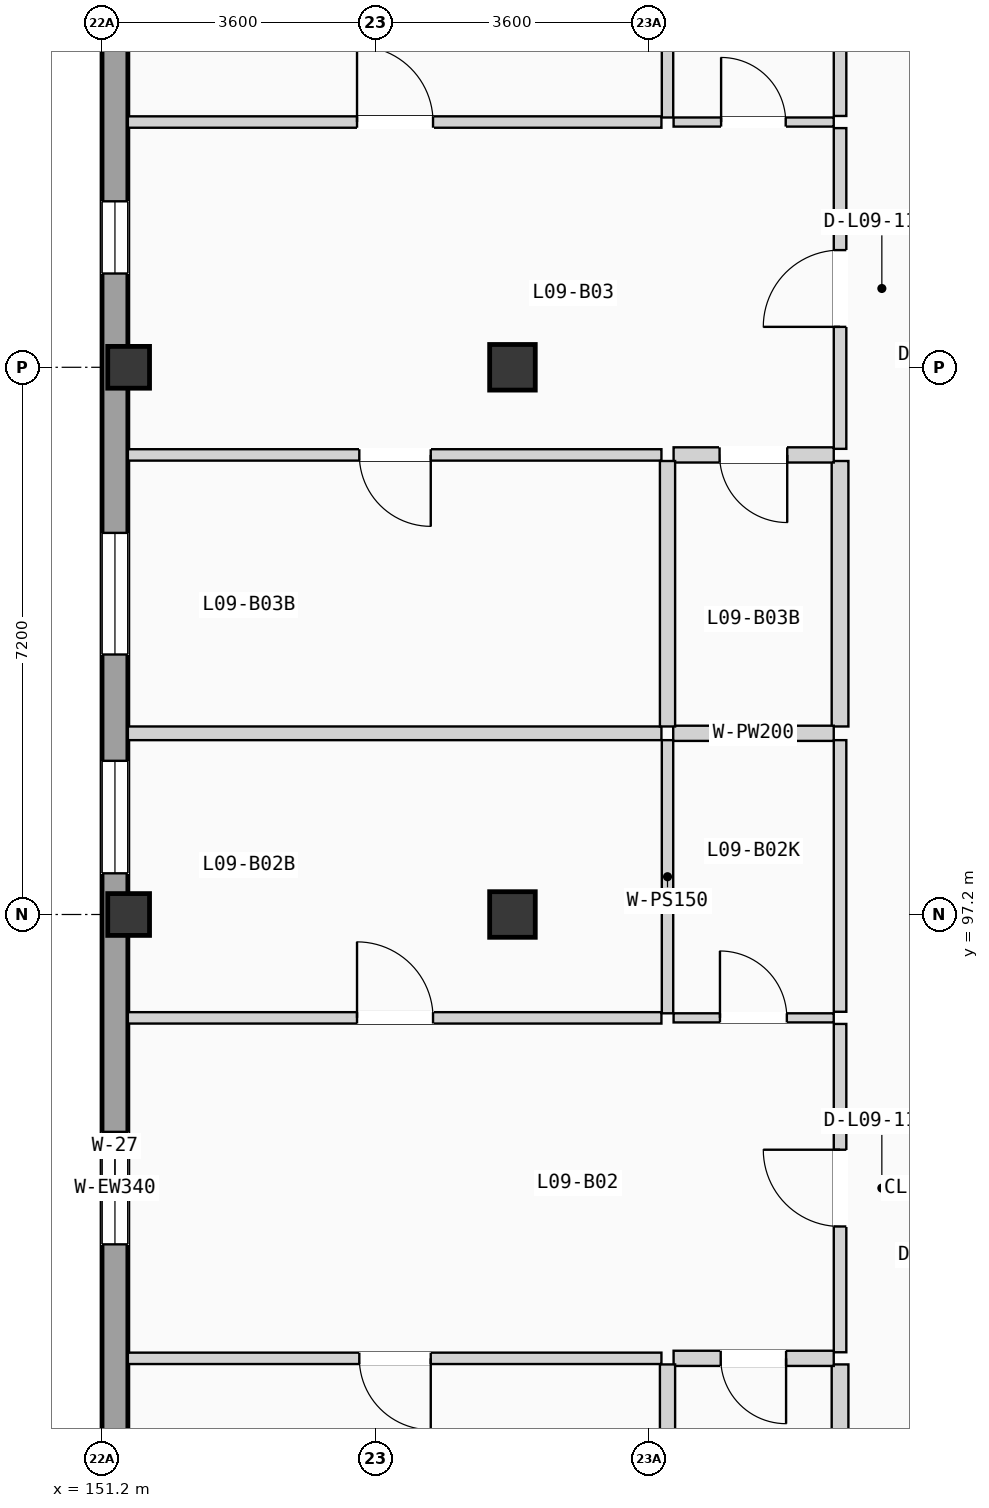
"""IFC4 building model, lengths in metres.
Left out: names, types, materials, properties, quantities, classifications, styles, units other than length and angle.
Written with IfcOpenShell. Run it as: python <this file> out.ifc"""

import sys

from ifc_helpers import new_model, si_unit, direction, frame, frame_2d, origin, origin_2d, place, context, subcontext, project, spatial, rectangle, extrude, element, fill, save


model = new_model("IFC4")
c1 = context("Model", 3, precision=1e-05, world=origin(), true_north=direction((0.0, 1.0)))
c2 = subcontext(c1, "Body", "Model", "MODEL_VIEW")
j1 = project(units=[si_unit("LENGTHUNIT", "METRE"), si_unit("PLANEANGLEUNIT", "RADIAN")], contexts=[c1])
p1 = place(None, origin())
s1 = spatial("IfcSite", under=j1, at=p1, CompositionType="ELEMENT")
p2 = place(p1, origin())
s2 = spatial("IfcBuilding", under=s1, at=p2, CompositionType="ELEMENT")
p3 = place(p2, frame((0.0, 0.0, 30.975)))
s3 = spatial("IfcBuildingStorey", under=s2, at=p3, CompositionType="ELEMENT", Elevation=30.975)
for number, where, z_axis, x_axis in (
    (1, (151.55, 97.2, 0.0), (0.0, 0.0, 1.0), (1.0, 0.0, 0.0)),
    (2, (151.55, 104.4, 0.0), (0.0, 0.0, 1.0), (1.0, 0.0, 0.0)),
):
    element("IfcColumn", number, at=place(p3, frame(where, z_axis=z_axis, x_axis=x_axis)), inside=s3, PredefinedType="COLUMN", context=c2, shape_type="SweptSolid", body=[
        extrude(rectangle(XDim=0.55, YDim=0.55, at=origin_2d()), origin(), (0.0, 0.0, 1.0), 3.15),
    ])
for number, where, z_axis, x_axis in (
    (3, (156.6, 97.2, 0.0), (0.0, 0.0, 1.0), (1.0, 0.0, 0.0)),
    (4, (156.6, 104.4, 0.0), (0.0, 0.0, 1.0), (1.0, 0.0, 0.0)),
):
    element("IfcColumn", number, at=place(p3, frame(where, z_axis=z_axis, x_axis=x_axis)), inside=s3, PredefinedType="COLUMN", context=c2, shape_type="SweptSolid", body=[
        extrude(rectangle(XDim=0.6, YDim=0.6, at=origin_2d()), origin(), (0.0, 0.0, 1.0), 3.15),
    ])
p4 = place(p3, frame((151.37, 68.74, 0.0), z_axis=(0.0, 0.0, 1.0), x_axis=(0.0, 1.0, 0.0)))
e5 = element("IfcWall", 5, at=p4, inside=s3, PredefinedType="SOLIDWALL", context=c2, shape_type="SweptSolid", body=[
    extrude(rectangle(XDim=49.72, YDim=0.34, at=frame_2d((24.86, 0.0))), origin(), (0.0, 0.0, 1.0), 2.9),
])
p5 = place(p4, frame((11.677, 0.0, 0.565)))
e6 = element("IfcOpeningElement", 6, at=p5, cuts=e5, PredefinedType="OPENING", context=c2, shape_type="SweptSolid", body=[
    extrude(rectangle(XDim=1.35, YDim=1.65, at=frame_2d((0.675, 0.825))), frame((0.0, 0.18, 0.0), z_axis=(0.0, -1.0, 0.0), x_axis=(1.0, 0.0, 0.0)), (0.0, 0.0, 1.0), 0.36),
])
p6 = place(p4, frame((8.532, 0.0, 0.85)))
e7 = element("IfcOpeningElement", 7, at=p6, cuts=e5, PredefinedType="OPENING", context=c2, shape_type="SweptSolid", body=[
    extrude(rectangle(XDim=0.95, YDim=1.2, at=frame_2d((0.475, 0.6))), frame((0.0, 0.18, 0.0), z_axis=(0.0, -1.0, 0.0), x_axis=(1.0, 0.0, 0.0)), (0.0, 0.0, 1.0), 0.36),
])
p7 = place(p4, frame((16.3, 0.0, 0.9)))
e8 = element("IfcOpeningElement", 8, at=p7, cuts=e5, PredefinedType="OPENING", context=c2, shape_type="SweptSolid", body=[
    extrude(rectangle(XDim=1.48, YDim=1.2, at=frame_2d((0.74, 0.6))), frame((0.0, 0.18, 0.0), z_axis=(0.0, -1.0, 0.0), x_axis=(1.0, 0.0, 0.0)), (0.0, 0.0, 1.0), 0.36),
])
p8 = place(p4, frame((24.12, 0.0, 0.865)))
e9 = element("IfcOpeningElement", 9, at=p8, cuts=e5, PredefinedType="OPENING", context=c2, shape_type="SweptSolid", body=[
    extrude(rectangle(XDim=1.48, YDim=1.35, at=frame_2d((0.74, 0.675))), frame((0.0, 0.18, 0.0), z_axis=(0.0, -1.0, 0.0), x_axis=(1.0, 0.0, 0.0)), (0.0, 0.0, 1.0), 0.36),
])
p9 = place(p4, frame((19.238, 0.0, 0.715)))
e10 = element("IfcOpeningElement", 10, at=p9, cuts=e5, PredefinedType="OPENING", context=c2, shape_type="SweptSolid", body=[
    extrude(rectangle(XDim=1.48, YDim=1.5, at=frame_2d((0.74, 0.75))), frame((0.0, 0.18, 0.0), z_axis=(0.0, -1.0, 0.0), x_axis=(1.0, 0.0, 0.0)), (0.0, 0.0, 1.0), 0.36),
])
p10 = place(p4, frame((29.002, 0.0, 0.565)))
e11 = element("IfcOpeningElement", 11, at=p10, cuts=e5, PredefinedType="OPENING", context=c2, shape_type="SweptSolid", body=[
    extrude(rectangle(XDim=1.48, YDim=1.65, at=frame_2d((0.74, 0.825))), frame((0.0, 0.18, 0.0), z_axis=(0.0, -1.0, 0.0), x_axis=(1.0, 0.0, 0.0)), (0.0, 0.0, 1.0), 0.36),
])
p11 = place(p4, frame((36.894, 0.0, 0.85)))
e12 = element("IfcOpeningElement", 12, at=p11, cuts=e5, PredefinedType="OPENING", context=c2, shape_type="SweptSolid", body=[
    extrude(rectangle(XDim=0.95, YDim=1.2, at=frame_2d((0.475, 0.6))), frame((0.0, 0.18, 0.0), z_axis=(0.0, -1.0, 0.0), x_axis=(1.0, 0.0, 0.0)), (0.0, 0.0, 1.0), 0.36),
])
p12 = place(p4, frame((31.881, 0.0, 0.9)))
e13 = element("IfcOpeningElement", 13, at=p12, cuts=e5, PredefinedType="OPENING", context=c2, shape_type="SweptSolid", body=[
    extrude(rectangle(XDim=1.6, YDim=1.2, at=frame_2d((0.8, 0.6))), frame((0.0, 0.18, 0.0), z_axis=(0.0, -1.0, 0.0), x_axis=(1.0, 0.0, 0.0)), (0.0, 0.0, 1.0), 0.36),
])
p13 = place(p4, frame((39.913, 0.0, 0.865)))
e14 = element("IfcOpeningElement", 14, at=p13, cuts=e5, PredefinedType="OPENING", context=c2, shape_type="SweptSolid", body=[
    extrude(rectangle(XDim=1.6, YDim=1.35, at=frame_2d((0.8, 0.675))), frame((0.0, 0.18, 0.0), z_axis=(0.0, -1.0, 0.0), x_axis=(1.0, 0.0, 0.0)), (0.0, 0.0, 1.0), 0.36),
])
p14 = place(p3, frame((160.91, 91.44, 0.0), z_axis=(0.0, 0.0, 1.0), x_axis=(0.0, 1.0, 0.0)))
e15 = element("IfcWall", 15, at=p14, inside=s3, PredefinedType="PARTITIONING", context=c2, shape_type="SweptSolid", body=[
    extrude(rectangle(XDim=4.32, YDim=0.165, at=frame_2d((2.16, 0.0))), origin(), (0.0, 0.0, 1.0), 2.87),
])
p15 = place(p14, frame((1.655, 0.0, 0.0)))
e16 = element("IfcOpeningElement", 16, at=p15, cuts=e15, PredefinedType="OPENING", context=c2, shape_type="SweptSolid", body=[
    extrude(rectangle(XDim=1.01, YDim=2.11, at=frame_2d((0.505, 1.055))), frame((0.0, 0.093, 0.0), z_axis=(0.0, -1.0, 0.0), x_axis=(1.0, 0.0, 0.0)), (0.0, 0.0, 1.0), 0.185),
])
p16 = place(p3, frame((160.91, 87.706, 0.0), z_axis=(0.0, 0.0, 1.0), x_axis=(0.0, 1.0, 0.0)))
e17 = element("IfcWall", 17, at=p16, inside=s3, PredefinedType="PLUMBINGWALL", context=c2, shape_type="SweptSolid", body=[
    extrude(rectangle(XDim=3.574, YDim=0.22, at=frame_2d((1.787, 0.0))), origin(), (0.0, 0.0, 1.0), 2.87),
])
p17 = place(p3, frame((160.91, 95.92, 0.0), z_axis=(0.0, 0.0, 1.0), x_axis=(0.0, 1.0, 0.0)))
e18 = element("IfcWall", 18, at=p17, inside=s3, PredefinedType="PARTITIONING", context=c2, shape_type="SweptSolid", body=[
    extrude(rectangle(XDim=3.574, YDim=0.165, at=frame_2d((1.787, 0.0))), origin(), (0.0, 0.0, 1.0), 2.87),
])
p18 = place(p3, frame((160.91, 103.327, 0.0), z_axis=(0.0, 0.0, 1.0), x_axis=(0.0, 1.0, 0.0)))
e19 = element("IfcWall", 19, at=p18, inside=s3, PredefinedType="PARTITIONING", context=c2, shape_type="SweptSolid", body=[
    extrude(rectangle(XDim=4.22, YDim=0.165, at=frame_2d((2.11, 0.0))), origin(), (0.0, 0.0, 1.0), 2.87),
])
p19 = place(p18, frame((1.605, 0.0, 0.0)))
e20 = element("IfcOpeningElement", 20, at=p19, cuts=e19, PredefinedType="OPENING", context=c2, shape_type="SweptSolid", body=[
    extrude(rectangle(XDim=1.01, YDim=2.11, at=frame_2d((0.505, 1.055))), frame((0.0, 0.093, 0.0), z_axis=(0.0, -1.0, 0.0), x_axis=(1.0, 0.0, 0.0)), (0.0, 0.0, 1.0), 0.185),
])
p20 = place(p3, frame((160.91, 99.674, 0.0), z_axis=(0.0, 0.0, 1.0), x_axis=(0.0, 1.0, 0.0)))
e21 = element("IfcWall", 21, at=p20, inside=s3, PredefinedType="PLUMBINGWALL", context=c2, shape_type="SweptSolid", body=[
    extrude(rectangle(XDim=3.493, YDim=0.22, at=frame_2d((1.747, 0.0))), origin(), (0.0, 0.0, 1.0), 2.87),
])
p21 = place(p3, frame((160.91, 107.707, 0.0), z_axis=(0.0, 0.0, 1.0), x_axis=(0.0, 1.0, 0.0)))
e22 = element("IfcWall", 22, at=p21, inside=s3, PredefinedType="PARTITIONING", context=c2, shape_type="SweptSolid", body=[
    extrude(rectangle(XDim=3.493, YDim=0.165, at=frame_2d((1.747, 0.0))), origin(), (0.0, 0.0, 1.0), 2.87),
])
p22 = place(p3, frame((158.72, 91.36, 0.0), z_axis=(0.0, 0.0, 1.0), x_axis=(1.0, 0.0, 0.0)))
e23 = element("IfcWall", 23, at=p22, inside=s3, PredefinedType="PLUMBINGWALL", context=c2, shape_type="SweptSolid", body=[
    extrude(rectangle(XDim=2.107, YDim=0.2, at=frame_2d((1.053, 0.0))), origin(), (0.0, 0.0, 1.0), 2.87),
])
p23 = place(p22, frame((0.62, 0.0, 0.0)))
e24 = element("IfcOpeningElement", 24, at=p23, cuts=e23, PredefinedType="OPENING", context=c2, shape_type="SweptSolid", body=[
    extrude(rectangle(XDim=0.86, YDim=2.0, at=frame_2d((0.43, 1.0))), frame((0.0, 0.11, 0.0), z_axis=(0.0, -1.0, 0.0), x_axis=(1.0, 0.0, 0.0)), (0.0, 0.0, 1.0), 0.22),
])
p24 = place(p3, frame((158.72, 95.84, 0.0), z_axis=(0.0, 0.0, 1.0), x_axis=(1.0, 0.0, 0.0)))
e25 = element("IfcWall", 25, at=p24, inside=s3, PredefinedType="PARTITIONING", context=c2, shape_type="SweptSolid", body=[
    extrude(rectangle(XDim=2.107, YDim=0.12, at=frame_2d((1.053, 0.0))), origin(), (0.0, 0.0, 1.0), 2.87),
])
p25 = place(p24, frame((0.61, 0.0, 0.0)))
e26 = element("IfcOpeningElement", 26, at=p25, cuts=e25, PredefinedType="OPENING", context=c2, shape_type="SweptSolid", body=[
    extrude(rectangle(XDim=0.88, YDim=2.02, at=frame_2d((0.44, 1.01))), frame((0.0, 0.07, 0.0), z_axis=(0.0, -1.0, 0.0), x_axis=(1.0, 0.0, 0.0)), (0.0, 0.0, 1.0), 0.14),
])
p26 = place(p3, frame((151.54, 91.36, 0.0), z_axis=(0.0, 0.0, 1.0), x_axis=(1.0, 0.0, 0.0)))
e27 = element("IfcWall", 27, at=p26, inside=s3, PredefinedType="PARTITIONING", context=c2, shape_type="SweptSolid", body=[
    extrude(rectangle(XDim=7.02, YDim=0.15, at=frame_2d((3.51, 0.0))), origin(), (0.0, 0.0, 1.0), 2.87),
])
p27 = place(p26, frame((3.045, 0.0, 0.0)))
e28 = element("IfcOpeningElement", 28, at=p27, cuts=e27, PredefinedType="OPENING", context=c2, shape_type="SweptSolid", body=[
    extrude(rectangle(XDim=0.94, YDim=2.06, at=frame_2d((0.47, 1.03))), frame((0.0, 0.085, 0.0), z_axis=(0.0, -1.0, 0.0), x_axis=(1.0, 0.0, 0.0)), (0.0, 0.0, 1.0), 0.17),
])
p28 = place(p3, frame((151.54, 95.84, 0.0), z_axis=(0.0, 0.0, 1.0), x_axis=(1.0, 0.0, 0.0)))
e29 = element("IfcWall", 29, at=p28, inside=s3, PredefinedType="PARTITIONING", context=c2, shape_type="SweptSolid", body=[
    extrude(rectangle(XDim=7.02, YDim=0.15, at=frame_2d((3.51, 0.0))), origin(), (0.0, 0.0, 1.0), 2.87),
])
p29 = place(p28, frame((3.015, 0.0, 0.0)))
e30 = element("IfcOpeningElement", 30, at=p29, cuts=e29, PredefinedType="OPENING", context=c2, shape_type="SweptSolid", body=[
    extrude(rectangle(XDim=1.0, YDim=2.06, at=frame_2d((0.5, 1.03))), frame((0.0, 0.085, 0.0), z_axis=(0.0, -1.0, 0.0), x_axis=(1.0, 0.0, 0.0)), (0.0, 0.0, 1.0), 0.17),
])
p30 = place(p3, frame((158.64, 87.706, 0.0), z_axis=(0.0, 0.0, 1.0), x_axis=(0.0, 1.0, 0.0)))
e31 = element("IfcWall", 31, at=p30, inside=s3, PredefinedType="PLUMBINGWALL", context=c2, shape_type="SweptSolid", body=[
    extrude(rectangle(XDim=3.574, YDim=0.2, at=frame_2d((1.787, 0.0))), origin(), (0.0, 0.0, 1.0), 2.87),
])
p31 = place(p3, frame((158.64, 95.9, 0.0), z_axis=(0.0, 0.0, 1.0), x_axis=(0.0, 1.0, 0.0)))
e32 = element("IfcWall", 32, at=p31, inside=s3, PredefinedType="PARTITIONING", context=c2, shape_type="SweptSolid", body=[
    extrude(rectangle(XDim=3.594, YDim=0.15, at=frame_2d((1.797, 0.0))), origin(), (0.0, 0.0, 1.0), 2.87),
])
p32 = place(p3, frame((158.715, 99.584, 0.0), z_axis=(0.0, 0.0, 1.0), x_axis=(1.0, 0.0, 0.0)))
e33 = element("IfcWall", 33, at=p32, inside=s3, PredefinedType="PLUMBINGWALL", context=c2, shape_type="SweptSolid", body=[
    extrude(rectangle(XDim=2.112, YDim=0.2, at=frame_2d((1.056, 0.0))), origin(), (0.0, 0.0, 1.0), 2.87),
])
p33 = place(p3, frame((151.54, 99.584, 0.0), z_axis=(0.0, 0.0, 1.0), x_axis=(1.0, 0.0, 0.0)))
e34 = element("IfcWall", 34, at=p33, inside=s3, PredefinedType="PARTITIONING", context=c2, shape_type="SweptSolid", body=[
    extrude(rectangle(XDim=7.02, YDim=0.18, at=frame_2d((3.51, 0.0))), origin(), (0.0, 0.0, 1.0), 2.87),
])
p34 = place(p3, frame((158.72, 103.247, 0.0), z_axis=(0.0, 0.0, 1.0), x_axis=(1.0, 0.0, 0.0)))
e35 = element("IfcWall", 35, at=p34, inside=s3, PredefinedType="PLUMBINGWALL", context=c2, shape_type="SweptSolid", body=[
    extrude(rectangle(XDim=2.107, YDim=0.2, at=frame_2d((1.053, 0.0))), origin(), (0.0, 0.0, 1.0), 2.87),
])
p35 = place(p34, frame((0.605, 0.0, 0.0)))
e36 = element("IfcOpeningElement", 36, at=p35, cuts=e35, PredefinedType="OPENING", context=c2, shape_type="SweptSolid", body=[
    extrude(rectangle(XDim=0.89, YDim=2.03, at=frame_2d((0.445, 1.015))), frame((0.0, 0.11, 0.0), z_axis=(0.0, -1.0, 0.0), x_axis=(1.0, 0.0, 0.0)), (0.0, 0.0, 1.0), 0.22),
])
p36 = place(p3, frame((158.72, 107.627, 0.0), z_axis=(0.0, 0.0, 1.0), x_axis=(1.0, 0.0, 0.0)))
e37 = element("IfcWall", 37, at=p36, inside=s3, PredefinedType="PARTITIONING", context=c2, shape_type="SweptSolid", body=[
    extrude(rectangle(XDim=2.107, YDim=0.12, at=frame_2d((1.053, 0.0))), origin(), (0.0, 0.0, 1.0), 2.87),
])
p37 = place(p36, frame((0.625, 0.0, 0.0)))
e38 = element("IfcOpeningElement", 38, at=p37, cuts=e37, PredefinedType="OPENING", context=c2, shape_type="SweptSolid", body=[
    extrude(rectangle(XDim=0.85, YDim=2.01, at=frame_2d((0.425, 1.005))), frame((0.0, 0.07, 0.0), z_axis=(0.0, -1.0, 0.0), x_axis=(1.0, 0.0, 0.0)), (0.0, 0.0, 1.0), 0.14),
])
p38 = place(p3, frame((151.54, 103.247, 0.0), z_axis=(0.0, 0.0, 1.0), x_axis=(1.0, 0.0, 0.0)))
e39 = element("IfcWall", 39, at=p38, inside=s3, PredefinedType="PARTITIONING", context=c2, shape_type="SweptSolid", body=[
    extrude(rectangle(XDim=7.02, YDim=0.15, at=frame_2d((3.51, 0.0))), origin(), (0.0, 0.0, 1.0), 2.87),
])
p39 = place(p38, frame((3.045, 0.0, 0.0)))
e40 = element("IfcOpeningElement", 40, at=p39, cuts=e39, PredefinedType="OPENING", context=c2, shape_type="SweptSolid", body=[
    extrude(rectangle(XDim=0.94, YDim=2.06, at=frame_2d((0.47, 1.03))), frame((0.0, 0.085, 0.0), z_axis=(0.0, -1.0, 0.0), x_axis=(1.0, 0.0, 0.0)), (0.0, 0.0, 1.0), 0.17),
])
p40 = place(p3, frame((151.54, 107.627, 0.0), z_axis=(0.0, 0.0, 1.0), x_axis=(1.0, 0.0, 0.0)))
e41 = element("IfcWall", 41, at=p40, inside=s3, PredefinedType="PARTITIONING", context=c2, shape_type="SweptSolid", body=[
    extrude(rectangle(XDim=7.02, YDim=0.15, at=frame_2d((3.51, 0.0))), origin(), (0.0, 0.0, 1.0), 2.87),
])
p41 = place(p40, frame((3.015, 0.0, 0.0)))
e42 = element("IfcOpeningElement", 42, at=p41, cuts=e41, PredefinedType="OPENING", context=c2, shape_type="SweptSolid", body=[
    extrude(rectangle(XDim=1.0, YDim=2.06, at=frame_2d((0.5, 1.03))), frame((0.0, 0.085, 0.0), z_axis=(0.0, -1.0, 0.0), x_axis=(1.0, 0.0, 0.0)), (0.0, 0.0, 1.0), 0.17),
])
p42 = place(p3, frame((158.64, 99.674, 0.0), z_axis=(0.0, 0.0, 1.0), x_axis=(0.0, 1.0, 0.0)))
e43 = element("IfcWall", 43, at=p42, inside=s3, PredefinedType="PLUMBINGWALL", context=c2, shape_type="SweptSolid", body=[
    extrude(rectangle(XDim=3.493, YDim=0.2, at=frame_2d((1.747, 0.0))), origin(), (0.0, 0.0, 1.0), 2.87),
])
p43 = place(p3, frame((158.64, 107.687, 0.0), z_axis=(0.0, 0.0, 1.0), x_axis=(0.0, 1.0, 0.0)))
e44 = element("IfcWall", 44, at=p43, inside=s3, PredefinedType="PARTITIONING", context=c2, shape_type="SweptSolid", body=[
    extrude(rectangle(XDim=3.513, YDim=0.15, at=frame_2d((1.756, 0.0))), origin(), (0.0, 0.0, 1.0), 2.87),
])
p44 = place(p8, origin())
e45 = element("IfcWindow", 45, at=p44, inside=s3, PartitioningType="SINGLE_PANEL", PredefinedType="WINDOW", context=c2, shape_type="SweptSolid", body=[
    extrude(rectangle(XDim=1.48, YDim=1.35, at=frame_2d((0.74, 0.675))), frame((0.0, 0.03, 0.0), z_axis=(0.0, -1.0, 0.0), x_axis=(1.0, 0.0, 0.0)), (0.0, 0.0, 1.0), 0.06),
])
fill(e9, e45)
p45 = place(p10, origin())
e46 = element("IfcWindow", 46, at=p45, inside=s3, PartitioningType="SINGLE_PANEL", PredefinedType="WINDOW", context=c2, shape_type="SweptSolid", body=[
    extrude(rectangle(XDim=1.48, YDim=1.65, at=frame_2d((0.74, 0.825))), frame((0.0, 0.03, 0.0), z_axis=(0.0, -1.0, 0.0), x_axis=(1.0, 0.0, 0.0)), (0.0, 0.0, 1.0), 0.06),
])
fill(e11, e46)
p46 = place(p11, origin())
e47 = element("IfcWindow", 47, at=p46, inside=s3, PartitioningType="SINGLE_PANEL", PredefinedType="WINDOW", context=c2, shape_type="SweptSolid", body=[
    extrude(rectangle(XDim=0.95, YDim=1.2, at=frame_2d((0.475, 0.6))), frame((0.0, 0.03, 0.0), z_axis=(0.0, -1.0, 0.0), x_axis=(1.0, 0.0, 0.0)), (0.0, 0.0, 1.0), 0.06),
])
fill(e12, e47)
p47 = place(p12, origin())
e48 = element("IfcWindow", 48, at=p47, inside=s3, PartitioningType="DOUBLE_PANEL_VERTICAL", PredefinedType="WINDOW", context=c2, shape_type="SweptSolid", body=[
    extrude(rectangle(XDim=1.6, YDim=1.2, at=frame_2d((0.8, 0.6))), frame((0.0, 0.03, 0.0), z_axis=(0.0, -1.0, 0.0), x_axis=(1.0, 0.0, 0.0)), (0.0, 0.0, 1.0), 0.06),
])
fill(e13, e48)
p48 = place(p15, origin())
e49 = element("IfcDoor", 49, at=p48, inside=s3, OperationType="SINGLE_SWING_RIGHT", PredefinedType="DOOR", context=c2, shape_type="SweptSolid", body=[
    extrude(rectangle(XDim=1.01, YDim=2.11, at=frame_2d((0.505, 1.055))), frame((0.0, 0.025, 0.0), z_axis=(0.0, -1.0, 0.0), x_axis=(1.0, 0.0, 0.0)), (0.0, 0.0, 1.0), 0.05),
])
fill(e16, e49)
p49 = place(p19, origin())
e50 = element("IfcDoor", 50, at=p49, inside=s3, OperationType="SINGLE_SWING_LEFT", PredefinedType="DOOR", context=c2, shape_type="SweptSolid", body=[
    extrude(rectangle(XDim=1.01, YDim=2.11, at=frame_2d((0.505, 1.055))), frame((0.0, 0.025, 0.0), z_axis=(0.0, -1.0, 0.0), x_axis=(1.0, 0.0, 0.0)), (0.0, 0.0, 1.0), 0.05),
])
fill(e20, e50)
p50 = place(p23, frame((0.86, 0.0, 0.0), z_axis=(0.0, 0.0, 1.0), x_axis=(-1.0, 0.0, 0.0)))
e51 = element("IfcDoor", 51, at=p50, inside=s3, OperationType="SINGLE_SWING_RIGHT", PredefinedType="DOOR", context=c2, shape_type="SweptSolid", body=[
    extrude(rectangle(XDim=0.86, YDim=2.0, at=frame_2d((0.43, 1.0))), frame((0.0, 0.025, 0.0), z_axis=(0.0, -1.0, 0.0), x_axis=(1.0, 0.0, 0.0)), (0.0, 0.0, 1.0), 0.05),
])
fill(e24, e51)
p51 = place(p25, origin())
e52 = element("IfcDoor", 52, at=p51, inside=s3, OperationType="SINGLE_SWING_LEFT", PredefinedType="DOOR", context=c2, shape_type="SweptSolid", body=[
    extrude(rectangle(XDim=0.88, YDim=2.02, at=frame_2d((0.44, 1.01))), frame((0.0, 0.025, 0.0), z_axis=(0.0, -1.0, 0.0), x_axis=(1.0, 0.0, 0.0)), (0.0, 0.0, 1.0), 0.05),
])
fill(e26, e52)
p52 = place(p27, frame((0.94, 0.0, 0.0), z_axis=(0.0, 0.0, 1.0), x_axis=(-1.0, 0.0, 0.0)))
e53 = element("IfcDoor", 53, at=p52, inside=s3, OperationType="SINGLE_SWING_RIGHT", PredefinedType="DOOR", context=c2, shape_type="SweptSolid", body=[
    extrude(rectangle(XDim=0.94, YDim=2.06, at=frame_2d((0.47, 1.03))), frame((0.0, 0.025, 0.0), z_axis=(0.0, -1.0, 0.0), x_axis=(1.0, 0.0, 0.0)), (0.0, 0.0, 1.0), 0.05),
])
fill(e28, e53)
p53 = place(p29, origin())
e54 = element("IfcDoor", 54, at=p53, inside=s3, OperationType="SINGLE_SWING_LEFT", PredefinedType="DOOR", context=c2, shape_type="SweptSolid", body=[
    extrude(rectangle(XDim=1.0, YDim=2.06, at=frame_2d((0.5, 1.03))), frame((0.0, 0.025, 0.0), z_axis=(0.0, -1.0, 0.0), x_axis=(1.0, 0.0, 0.0)), (0.0, 0.0, 1.0), 0.05),
])
fill(e30, e54)
p54 = place(p35, frame((0.89, 0.0, 0.0), z_axis=(0.0, 0.0, 1.0), x_axis=(-1.0, 0.0, 0.0)))
e55 = element("IfcDoor", 55, at=p54, inside=s3, OperationType="SINGLE_SWING_RIGHT", PredefinedType="DOOR", context=c2, shape_type="SweptSolid", body=[
    extrude(rectangle(XDim=0.89, YDim=2.03, at=frame_2d((0.445, 1.015))), frame((0.0, 0.025, 0.0), z_axis=(0.0, -1.0, 0.0), x_axis=(1.0, 0.0, 0.0)), (0.0, 0.0, 1.0), 0.05),
])
fill(e36, e55)
p55 = place(p37, origin())
e56 = element("IfcDoor", 56, at=p55, inside=s3, OperationType="SINGLE_SWING_LEFT", PredefinedType="DOOR", context=c2, shape_type="SweptSolid", body=[
    extrude(rectangle(XDim=0.85, YDim=2.01, at=frame_2d((0.425, 1.005))), frame((0.0, 0.025, 0.0), z_axis=(0.0, -1.0, 0.0), x_axis=(1.0, 0.0, 0.0)), (0.0, 0.0, 1.0), 0.05),
])
fill(e38, e56)
p56 = place(p39, frame((0.94, 0.0, 0.0), z_axis=(0.0, 0.0, 1.0), x_axis=(-1.0, 0.0, 0.0)))
e57 = element("IfcDoor", 57, at=p56, inside=s3, OperationType="SINGLE_SWING_RIGHT", PredefinedType="DOOR", context=c2, shape_type="SweptSolid", body=[
    extrude(rectangle(XDim=0.94, YDim=2.06, at=frame_2d((0.47, 1.03))), frame((0.0, 0.025, 0.0), z_axis=(0.0, -1.0, 0.0), x_axis=(1.0, 0.0, 0.0)), (0.0, 0.0, 1.0), 0.05),
])
fill(e40, e57)
p57 = place(p41, origin())
e58 = element("IfcDoor", 58, at=p57, inside=s3, OperationType="SINGLE_SWING_LEFT", PredefinedType="DOOR", context=c2, shape_type="SweptSolid", body=[
    extrude(rectangle(XDim=1.0, YDim=2.06, at=frame_2d((0.5, 1.03))), frame((0.0, 0.025, 0.0), z_axis=(0.0, -1.0, 0.0), x_axis=(1.0, 0.0, 0.0)), (0.0, 0.0, 1.0), 0.05),
])
fill(e42, e58)
save(model, sys.argv[1])
